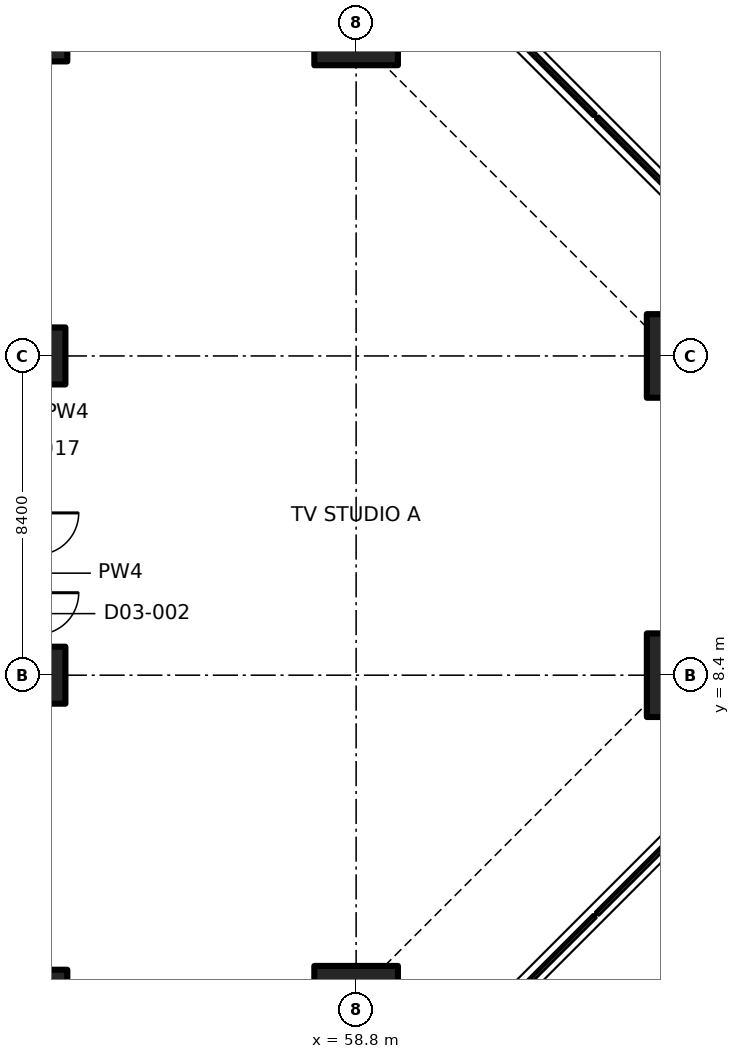
"""IFC4 building model, lengths in metres.
Left out: names, types, materials, properties, quantities, classifications, styles, units other than length and angle.
Written with IfcOpenShell. Run it as: python <this file> out.ifc"""

import sys

from ifc_helpers import new_model, si_unit, direction, frame, origin, origin_2d, place, context, subcontext, project, spatial, polyline, rectangle, outline, extrude, element, save


model = new_model("IFC4")
c1 = context("Model", 3, precision=1e-05, world=origin(), true_north=direction((0.0, 1.0)))
c2 = subcontext(c1, "Body", "Model", "MODEL_VIEW")
j1 = project(units=[si_unit("LENGTHUNIT", "METRE"), si_unit("PLANEANGLEUNIT", "RADIAN")], contexts=[c1])
p1 = place(None, origin())
s1 = spatial("IfcSite", under=j1, at=p1, CompositionType="ELEMENT")
p2 = place(p1, origin())
s2 = spatial("IfcBuilding", under=s1, at=p2, CompositionType="ELEMENT")
p3 = place(p2, frame((0.0, 0.0, 12.5)))
s3 = spatial("IfcBuildingStorey", under=s2, at=p3, CompositionType="ELEMENT", Elevation=12.5)
p4 = place(p3, frame((50.4, 0.0, 0.0), z_axis=(0.0, 0.0, 1.0), x_axis=(0.0, 1.0, 0.0)))
e1 = element("IfcColumn", 1, at=p4, inside=s3, PredefinedType="COLUMN", context=c2, shape_type="SweptSolid", body=[
    extrude(rectangle(XDim=1.3, YDim=1.6, at=origin_2d()), origin(), (0.0, 0.0, 1.0), 7.25),
])
for number, where, z_axis, x_axis in (
    (2, (50.4, 8.4, 0.0), (0.0, 0.0, 1.0), (1.0, 0.0, 0.0)),
    (3, (50.4, 16.8, 0.0), (0.0, 0.0, 1.0), (1.0, 0.0, 0.0)),
):
    element("IfcColumn", number, at=place(p3, frame(where, z_axis=z_axis, x_axis=x_axis)), inside=s3, PredefinedType="COLUMN", context=c2, shape_type="SweptSolid", body=[
        extrude(rectangle(XDim=1.5, YDim=1.5, at=origin_2d()), origin(), (0.0, 0.0, 1.0), 7.25),
    ])
p5 = place(p3, frame((50.4, 25.2, 0.0), z_axis=(0.0, 0.0, 1.0), x_axis=(0.0, 1.0, 0.0)))
e4 = element("IfcColumn", 4, at=p5, inside=s3, PredefinedType="COLUMN", context=c2, shape_type="SweptSolid", body=[
    extrude(rectangle(XDim=1.3, YDim=1.6, at=origin_2d()), origin(), (0.0, 0.0, 1.0), 7.25),
])
for number, where, z_axis, x_axis in (
    (5, (58.8, 0.0, 0.0), (0.0, 0.0, 1.0), (0.0, 1.0, 0.0)),
    (6, (58.8, 25.2, 0.0), (0.0, 0.0, 1.0), (0.0, 1.0, 0.0)),
    (7, (67.2, 8.4, 0.0), (0.0, 0.0, 1.0), (1.0, 0.0, 0.0)),
    (8, (67.2, 16.8, 0.0), (0.0, 0.0, 1.0), (1.0, 0.0, 0.0)),
):
    element("IfcColumn", number, at=place(p3, frame(where, z_axis=z_axis, x_axis=x_axis)), inside=s3, PredefinedType="COLUMN", context=c2, shape_type="SweptSolid", body=[
        extrude(rectangle(XDim=1.5, YDim=2.2, at=origin_2d()), origin(), (0.0, 0.0, 1.0), 7.25),
    ])
p6 = place(p3, origin())
e9 = element("IfcWall", 9, at=p6, inside=s3, PredefinedType="SOLIDWALL", context=c2, shape_type="SweptSolid", body=[
    extrude(outline(polyline([(62.096, -0.833), (65.033, 2.104), (65.118, 2.019), (62.181, -0.918), (62.096, -0.833)])), origin(), (0.0, 0.0, 1.0), 7.5),
])
p7 = place(p3, origin())
e10 = element("IfcWall", 10, at=p7, inside=s3, PredefinedType="SOLIDWALL", context=c2, shape_type="SweptSolid", body=[
    extrude(outline(polyline([(65.096, 2.167), (68.033, 5.104), (68.118, 5.019), (65.181, 2.082), (65.096, 2.167)])), origin(), (0.0, 0.0, 1.0), 7.5),
])
p8 = place(p3, origin())
e11 = element("IfcWall", 11, at=p8, inside=s3, PredefinedType="SOLIDWALL", context=c2, shape_type="SweptSolid", body=[
    extrude(outline(polyline([(68.033, 20.096), (65.096, 23.033), (65.181, 23.118), (68.118, 20.181), (68.033, 20.096)])), origin(), (0.0, 0.0, 1.0), 7.5),
])
p9 = place(p3, origin())
e12 = element("IfcWall", 12, at=p9, inside=s3, PredefinedType="SOLIDWALL", context=c2, shape_type="SweptSolid", body=[
    extrude(outline(polyline([(65.033, 23.096), (62.096, 26.033), (62.181, 26.118), (65.118, 23.181), (65.033, 23.096)])), origin(), (0.0, 0.0, 1.0), 7.5),
])
save(model, sys.argv[1])
